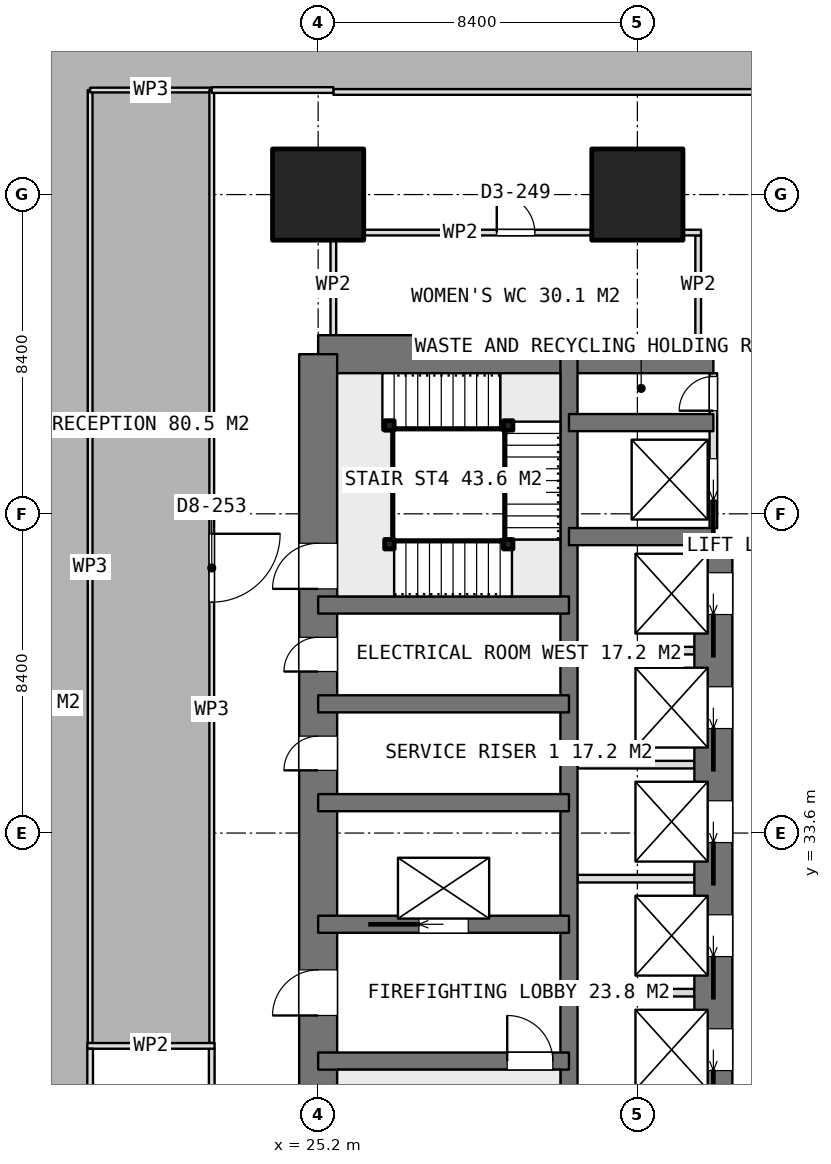
"""IFC4 building model, lengths in metres.
Left out: names, types, materials, properties, quantities, classifications, styles, units other than length and angle.
Written with IfcOpenShell. Run it as: python <this file> out.ifc"""

import sys

from ifc_helpers import new_model, si_unit, direction, frame, frame_2d, origin, origin_2d, place, context, subcontext, project, spatial, rectangle, extrude, element, fill, save


model = new_model("IFC4")
c1 = context("Model", 3, precision=1e-05, world=origin(), true_north=direction((0.0, 1.0)))
c2 = subcontext(c1, "Body", "Model", "MODEL_VIEW")
j1 = project(units=[si_unit("LENGTHUNIT", "METRE"), si_unit("PLANEANGLEUNIT", "RADIAN")], contexts=[c1])
p1 = place(None, origin())
s1 = spatial("IfcSite", under=j1, at=p1, CompositionType="ELEMENT")
p2 = place(p1, origin())
s2 = spatial("IfcBuilding", under=s1, at=p2, CompositionType="ELEMENT")
p3 = place(p2, frame((0.0, 0.0, 228.95)))
s3 = spatial("IfcBuildingStorey", under=s2, at=p3, CompositionType="ELEMENT", Elevation=228.95)
p4 = place(p3, frame((25.2, 46.2, 0.0), z_axis=(0.0, 0.0, 1.0), x_axis=(1.0, 0.0, 0.0)))
e1 = element("IfcWall", 1, at=p4, inside=s3, PredefinedType="SHEAR", context=c2, shape_type="SweptSolid", body=[
    extrude(rectangle(XDim=10.4, YDim=1.0, at=frame_2d((5.2, 0.0))), origin(), (0.0, 0.0, 1.0), 3.75),
])
p5 = place(p3, frame((25.2, 21.0, 0.0), z_axis=(0.0, 0.0, 1.0), x_axis=(0.0, 1.0, 0.0)))
e2 = element("IfcWall", 2, at=p5, inside=s3, PredefinedType="SHEAR", context=c2, shape_type="SweptSolid", body=[
    extrude(rectangle(XDim=25.2, YDim=1.0, at=frame_2d((12.6, 0.0))), origin(), (0.0, 0.0, 1.0), 3.75),
])
p6 = place(p5, frame((7.8, 0.0, 0.0)))
e3 = element("IfcOpeningElement", 3, at=p6, cuts=e2, PredefinedType="OPENING", context=c2, shape_type="SweptSolid", body=[
    extrude(rectangle(XDim=1.2, YDim=2.1, at=frame_2d((0.6, 1.05))), frame((0.0, 0.51, 0.0), z_axis=(0.0, -1.0, 0.0), x_axis=(1.0, 0.0, 0.0)), (0.0, 0.0, 1.0), 1.02),
])
p7 = place(p5, frame((14.25, 0.0, 0.0)))
e4 = element("IfcOpeningElement", 4, at=p7, cuts=e2, PredefinedType="OPENING", context=c2, shape_type="SweptSolid", body=[
    extrude(rectangle(XDim=0.9, YDim=2.1, at=frame_2d((0.45, 1.05))), frame((0.0, 0.51, 0.0), z_axis=(0.0, -1.0, 0.0), x_axis=(1.0, 0.0, 0.0)), (0.0, 0.0, 1.0), 1.02),
])
p8 = place(p5, frame((16.85, 0.0, 0.0)))
e5 = element("IfcOpeningElement", 5, at=p8, cuts=e2, PredefinedType="OPENING", context=c2, shape_type="SweptSolid", body=[
    extrude(rectangle(XDim=0.9, YDim=2.1, at=frame_2d((0.45, 1.05))), frame((0.0, 0.51, 0.0), z_axis=(0.0, -1.0, 0.0), x_axis=(1.0, 0.0, 0.0)), (0.0, 0.0, 1.0), 1.02),
])
p9 = place(p5, frame((19.025, 0.0, 0.0)))
e6 = element("IfcOpeningElement", 6, at=p9, cuts=e2, PredefinedType="OPENING", context=c2, shape_type="SweptSolid", body=[
    extrude(rectangle(XDim=1.2, YDim=2.1, at=frame_2d((0.6, 1.05))), frame((0.0, 0.51, 0.0), z_axis=(0.0, -1.0, 0.0), x_axis=(1.0, 0.0, 0.0)), (0.0, 0.0, 1.0), 1.02),
])
p10 = place(p3, frame((31.8, 21.0, 0.0), z_axis=(0.0, 0.0, 1.0), x_axis=(0.0, 1.0, 0.0)))
e7 = element("IfcWall", 7, at=p10, inside=s3, PredefinedType="SHEAR", context=c2, shape_type="SweptSolid", body=[
    extrude(rectangle(XDim=25.2, YDim=0.45, at=frame_2d((12.6, 0.0))), origin(), (0.0, 0.0, 1.0), 3.75),
])
p11 = place(p3, frame((35.6, 23.4, 0.0), z_axis=(0.0, 0.0, 1.0), x_axis=(0.0, 1.0, 0.0)))
e8 = element("IfcWall", 8, at=p11, inside=s3, PredefinedType="SHEAR", context=c2, shape_type="SweptSolid", body=[
    extrude(rectangle(XDim=18.0, YDim=1.0, at=frame_2d((9.0, 0.0))), origin(), (0.0, 0.0, 1.0), 3.75),
])
p12 = place(p11, frame((0.95, 0.0, 0.0)))
e9 = element("IfcOpeningElement", 9, at=p12, cuts=e8, PredefinedType="OPENING", context=c2, shape_type="SweptSolid", body=[
    extrude(rectangle(XDim=1.1, YDim=2.1, at=frame_2d((0.55, 1.05))), frame((0.0, 0.51, 0.0), z_axis=(0.0, -1.0, 0.0), x_axis=(1.0, 0.0, 0.0)), (0.0, 0.0, 1.0), 1.02),
])
p13 = place(p11, frame((3.95, 0.0, 0.0)))
e10 = element("IfcOpeningElement", 10, at=p13, cuts=e8, PredefinedType="OPENING", context=c2, shape_type="SweptSolid", body=[
    extrude(rectangle(XDim=1.1, YDim=2.1, at=frame_2d((0.55, 1.05))), frame((0.0, 0.51, 0.0), z_axis=(0.0, -1.0, 0.0), x_axis=(1.0, 0.0, 0.0)), (0.0, 0.0, 1.0), 1.02),
])
p14 = place(p11, frame((6.95, 0.0, 0.0)))
e11 = element("IfcOpeningElement", 11, at=p14, cuts=e8, PredefinedType="OPENING", context=c2, shape_type="SweptSolid", body=[
    extrude(rectangle(XDim=1.1, YDim=2.1, at=frame_2d((0.55, 1.05))), frame((0.0, 0.51, 0.0), z_axis=(0.0, -1.0, 0.0), x_axis=(1.0, 0.0, 0.0)), (0.0, 0.0, 1.0), 1.02),
])
p15 = place(p11, frame((9.95, 0.0, 0.0)))
e12 = element("IfcOpeningElement", 12, at=p15, cuts=e8, PredefinedType="OPENING", context=c2, shape_type="SweptSolid", body=[
    extrude(rectangle(XDim=1.1, YDim=2.1, at=frame_2d((0.55, 1.05))), frame((0.0, 0.51, 0.0), z_axis=(0.0, -1.0, 0.0), x_axis=(1.0, 0.0, 0.0)), (0.0, 0.0, 1.0), 1.02),
])
p16 = place(p11, frame((12.95, 0.0, 0.0)))
e13 = element("IfcOpeningElement", 13, at=p16, cuts=e8, PredefinedType="OPENING", context=c2, shape_type="SweptSolid", body=[
    extrude(rectangle(XDim=1.1, YDim=2.1, at=frame_2d((0.55, 1.05))), frame((0.0, 0.51, 0.0), z_axis=(0.0, -1.0, 0.0), x_axis=(1.0, 0.0, 0.0)), (0.0, 0.0, 1.0), 1.02),
])
p17 = place(p11, frame((15.95, 0.0, 0.0)))
e14 = element("IfcOpeningElement", 14, at=p17, cuts=e8, PredefinedType="OPENING", context=c2, shape_type="SweptSolid", body=[
    extrude(rectangle(XDim=1.1, YDim=2.1, at=frame_2d((0.55, 1.05))), frame((0.0, 0.51, 0.0), z_axis=(0.0, -1.0, 0.0), x_axis=(1.0, 0.0, 0.0)), (0.0, 0.0, 1.0), 1.02),
])
for number, where, z_axis, x_axis in (
    (15, (31.8, 41.4, 0.0), (0.0, 0.0, 1.0), (1.0, 0.0, 0.0)),
    (16, (31.8, 44.4, 0.0), (0.0, 0.0, 1.0), (1.0, 0.0, 0.0)),
):
    element("IfcWall", number, at=place(p3, frame(where, z_axis=z_axis, x_axis=x_axis)), inside=s3, PredefinedType="SHEAR", context=c2, shape_type="SweptSolid", body=[
        extrude(rectangle(XDim=3.8, YDim=0.45, at=frame_2d((1.9, 0.0))), origin(), (0.0, 0.0, 1.0), 3.75),
    ])
p18 = place(p3, frame((25.2, 27.6, 0.0), z_axis=(0.0, 0.0, 1.0), x_axis=(1.0, 0.0, 0.0)))
e17 = element("IfcWall", 17, at=p18, inside=s3, PredefinedType="SHEAR", context=c2, shape_type="SweptSolid", body=[
    extrude(rectangle(XDim=6.6, YDim=0.45, at=frame_2d((3.3, 0.0))), origin(), (0.0, 0.0, 1.0), 3.75),
])
p19 = place(p18, frame((4.975, 0.0, 0.0)))
e18 = element("IfcOpeningElement", 18, at=p19, cuts=e17, PredefinedType="OPENING", context=c2, shape_type="SweptSolid", body=[
    extrude(rectangle(XDim=1.2, YDim=2.1, at=frame_2d((0.6, 1.05))), frame((0.0, 0.235, 0.0), z_axis=(0.0, -1.0, 0.0), x_axis=(1.0, 0.0, 0.0)), (0.0, 0.0, 1.0), 0.47),
])
p20 = place(p3, frame((25.2, 31.2, 0.0), z_axis=(0.0, 0.0, 1.0), x_axis=(1.0, 0.0, 0.0)))
e19 = element("IfcWall", 19, at=p20, inside=s3, PredefinedType="SHEAR", context=c2, shape_type="SweptSolid", body=[
    extrude(rectangle(XDim=6.6, YDim=0.45, at=frame_2d((3.3, 0.0))), origin(), (0.0, 0.0, 1.0), 3.75),
])
p21 = place(p20, frame((2.65, 0.0, 0.0)))
e20 = element("IfcOpeningElement", 20, at=p21, cuts=e19, PredefinedType="OPENING", context=c2, shape_type="SweptSolid", body=[
    extrude(rectangle(XDim=1.3, YDim=2.1, at=frame_2d((0.65, 1.05))), frame((0.0, 0.235, 0.0), z_axis=(0.0, -1.0, 0.0), x_axis=(1.0, 0.0, 0.0)), (0.0, 0.0, 1.0), 0.47),
])
for number, where, z_axis, x_axis in (
    (21, (25.2, 34.4, 0.0), (0.0, 0.0, 1.0), (1.0, 0.0, 0.0)),
    (22, (25.2, 37.0, 0.0), (0.0, 0.0, 1.0), (1.0, 0.0, 0.0)),
    (23, (25.2, 39.6, 0.0), (0.0, 0.0, 1.0), (1.0, 0.0, 0.0)),
):
    element("IfcWall", number, at=place(p3, frame(where, z_axis=z_axis, x_axis=x_axis)), inside=s3, PredefinedType="SHEAR", context=c2, shape_type="SweptSolid", body=[
        extrude(rectangle(XDim=6.6, YDim=0.45, at=frame_2d((3.3, 0.0))), origin(), (0.0, 0.0, 1.0), 3.75),
    ])
for number, where, z_axis, x_axis in (
    (24, (25.2, 50.4, 0.0), (0.0, 0.0, 1.0), (1.0, 0.0, 0.0)),
    (25, (33.6, 50.4, 0.0), (0.0, 0.0, 1.0), (1.0, 0.0, 0.0)),
):
    element("IfcColumn", number, at=place(p3, frame(where, z_axis=z_axis, x_axis=x_axis)), inside=s3, PredefinedType="COLUMN", context=c2, shape_type="SweptSolid", body=[
        extrude(rectangle(XDim=2.4, YDim=2.4, at=origin_2d()), origin(), (0.0, 0.0, 1.0), 3.75),
    ])
for number, where, z_axis, x_axis in (
    (26, (32.025, 29.4, 0.0), (0.0, 0.0, 1.0), (1.0, 0.0, 0.0)),
    (27, (32.025, 32.4, 0.0), (0.0, 0.0, 1.0), (1.0, 0.0, 0.0)),
    (28, (32.025, 35.4, 0.0), (0.0, 0.0, 1.0), (1.0, 0.0, 0.0)),
    (29, (32.025, 38.4, 0.0), (0.0, 0.0, 1.0), (1.0, 0.0, 0.0)),
):
    element("IfcWall", number, at=place(p3, frame(where, z_axis=z_axis, x_axis=x_axis)), inside=s3, PredefinedType="PARTITIONING", context=c2, shape_type="SweptSolid", body=[
        extrude(rectangle(XDim=3.075, YDim=0.2, at=frame_2d((1.538, 0.0))), origin(), (0.0, 0.0, 1.0), 3.5),
    ])
p22 = place(p3, frame((35.6, 41.625, 0.0), z_axis=(0.0, 0.0, 1.0), x_axis=(0.0, 1.0, 0.0)))
e30 = element("IfcWall", 30, at=p22, inside=s3, PredefinedType="PARTITIONING", context=c2, shape_type="SweptSolid", body=[
    extrude(rectangle(XDim=4.075, YDim=0.2, at=frame_2d((2.038, 0.0))), origin(), (0.0, 0.0, 1.0), 3.5),
])
p23 = place(p22, frame((3.088, 0.0, 0.0)))
e31 = element("IfcOpeningElement", 31, at=p23, cuts=e30, PredefinedType="OPENING", context=c2, shape_type="SweptSolid", body=[
    extrude(rectangle(XDim=0.9, YDim=2.1, at=frame_2d((0.45, 1.05))), frame((0.0, 0.11, 0.0), z_axis=(0.0, -1.0, 0.0), x_axis=(1.0, 0.0, 0.0)), (0.0, 0.0, 1.0), 0.22),
])
p24 = place(p22, frame((0.725, 0.0, 0.0)))
e32 = element("IfcOpeningElement", 32, at=p24, cuts=e30, PredefinedType="OPENING", context=c2, shape_type="SweptSolid", body=[
    extrude(rectangle(XDim=1.1, YDim=2.1, at=frame_2d((0.55, 1.05))), frame((0.0, 0.11, 0.0), z_axis=(0.0, -1.0, 0.0), x_axis=(1.0, 0.0, 0.0)), (0.0, 0.0, 1.0), 0.22),
])
p25 = place(p3, frame((25.525, 49.4, 0.0), z_axis=(0.0, 0.0, 1.0), x_axis=(1.0, 0.0, 0.0)))
e33 = element("IfcWall", 33, at=p25, inside=s3, PredefinedType="PARTITIONING", context=c2, shape_type="SweptSolid", body=[
    extrude(rectangle(XDim=9.75, YDim=0.15, at=frame_2d((4.875, 0.0))), origin(), (0.0, 0.0, 1.0), 3.5),
])
p26 = place(p25, frame((4.375, 0.0, 0.0)))
e34 = element("IfcOpeningElement", 34, at=p26, cuts=e33, PredefinedType="OPENING", context=c2, shape_type="SweptSolid", body=[
    extrude(rectangle(XDim=1.0, YDim=2.1, at=frame_2d((0.5, 1.05))), frame((0.0, 0.085, 0.0), z_axis=(0.0, -1.0, 0.0), x_axis=(1.0, 0.0, 0.0)), (0.0, 0.0, 1.0), 0.17),
])
for number, where, z_axis, x_axis in (
    (35, (25.6, 46.7, 0.0), (0.0, 0.0, 1.0), (0.0, 1.0, 0.0)),
    (36, (35.2, 46.7, 0.0), (0.0, 0.0, 1.0), (0.0, 1.0, 0.0)),
):
    element("IfcWall", number, at=place(p3, frame(where, z_axis=z_axis, x_axis=x_axis)), inside=s3, PredefinedType="PARTITIONING", context=c2, shape_type="SweptSolid", body=[
        extrude(rectangle(XDim=2.625, YDim=0.15, at=frame_2d((1.312, 0.0))), origin(), (0.0, 0.0, 1.0), 3.5),
    ])
p27 = place(p3, frame((19.125, 28.0, 0.0), z_axis=(0.0, 0.0, 1.0), x_axis=(1.0, 0.0, 0.0)))
e37 = element("IfcWall", 37, at=p27, inside=s3, PredefinedType="PARTITIONING", context=c2, shape_type="SweptSolid", body=[
    extrude(rectangle(XDim=3.35, YDim=0.15, at=frame_2d((1.675, 0.0))), origin(), (0.0, 0.0, 1.0), 3.5),
])
p28 = place(p3, frame((19.2, 21.075, 0.0), z_axis=(0.0, 0.0, 1.0), x_axis=(0.0, 1.0, 0.0)))
e38 = element("IfcWall", 38, at=p28, inside=s3, PredefinedType="PARTITIONING", context=c2, shape_type="SweptSolid", body=[
    extrude(rectangle(XDim=6.85, YDim=0.15, at=frame_2d((3.425, 0.0))), origin(), (0.0, 0.0, 1.0), 3.5),
])
p29 = place(p3, frame((22.4, 21.075, 0.0), z_axis=(0.0, 0.0, 1.0), x_axis=(0.0, 1.0, 0.0)))
e39 = element("IfcWall", 39, at=p29, inside=s3, PredefinedType="PARTITIONING", context=c2, shape_type="SweptSolid", body=[
    extrude(rectangle(XDim=6.85, YDim=0.15, at=frame_2d((3.425, 0.0))), origin(), (0.0, 0.0, 1.0), 3.5),
])
p30 = place(p29, frame((2.925, 0.0, 0.0)))
e40 = element("IfcOpeningElement", 40, at=p30, cuts=e39, PredefinedType="OPENING", context=c2, shape_type="SweptSolid", body=[
    extrude(rectangle(XDim=1.0, YDim=2.1, at=frame_2d((0.5, 1.05))), frame((0.0, 0.085, 0.0), z_axis=(0.0, -1.0, 0.0), x_axis=(1.0, 0.0, 0.0)), (0.0, 0.0, 1.0), 0.17),
])
p31 = place(p3, frame((19.2, 28.075, 0.0), z_axis=(0.0, 0.0, 1.0), x_axis=(0.0, 1.0, 0.0)))
e41 = element("IfcWall", 41, at=p31, inside=s3, PredefinedType="PARTITIONING", context=c2, shape_type="SweptSolid", body=[
    extrude(rectangle(XDim=25.075, YDim=0.125, at=frame_2d((12.538, 0.0))), origin(), (0.0, 0.0, 1.0), 3.5),
])
p32 = place(p3, frame((19.2, 53.15, 0.0), z_axis=(0.0, 0.0, 1.0), x_axis=(1.0, 0.0, 0.0)))
e42 = element("IfcWall", 42, at=p32, inside=s3, PredefinedType="PARTITIONING", context=c2, shape_type="SweptSolid", body=[
    extrude(rectangle(XDim=3.2, YDim=0.125, at=frame_2d((1.6, 0.0))), origin(), (0.0, 0.0, 1.0), 3.5),
])
p33 = place(p3, frame((22.4, 53.15, 0.0), z_axis=(0.0, 0.0, 1.0), x_axis=(0.0, -1.0, 0.0)))
e43 = element("IfcWall", 43, at=p33, inside=s3, PredefinedType="PARTITIONING", context=c2, shape_type="SweptSolid", body=[
    extrude(rectangle(XDim=25.075, YDim=0.125, at=frame_2d((12.538, 0.0))), origin(), (0.0, 0.0, 1.0), 3.5),
])
p34 = place(p33, frame((11.675, 0.0, 0.0)))
e44 = element("IfcOpeningElement", 44, at=p34, cuts=e43, PredefinedType="OPENING", context=c2, shape_type="SweptSolid", body=[
    extrude(rectangle(XDim=1.8, YDim=2.1, at=frame_2d((0.9, 1.05))), frame((0.0, 0.073, 0.0), z_axis=(0.0, -1.0, 0.0), x_axis=(1.0, 0.0, 0.0)), (0.0, 0.0, 1.0), 0.145),
])
p35 = place(p3, frame((53.2, 53.1, 0.0), z_axis=(0.0, 0.0, 1.0), x_axis=(-1.0, 0.0, 0.0)))
e45 = element("IfcWall", 45, at=p35, inside=s3, PredefinedType="PARTITIONING", context=c2, shape_type="SweptSolid", body=[
    extrude(rectangle(XDim=27.6, YDim=0.15, at=frame_2d((13.8, 0.0))), origin(), (0.0, 0.0, 1.0), 3.5),
])
p36 = place(p35, frame((13.3, 0.0, 0.0)))
e46 = element("IfcOpeningElement", 46, at=p36, cuts=e45, PredefinedType="OPENING", context=c2, shape_type="SweptSolid", body=[
    extrude(rectangle(XDim=1.0, YDim=2.1, at=frame_2d((0.5, 1.05))), frame((0.0, 0.085, 0.0), z_axis=(0.0, -1.0, 0.0), x_axis=(1.0, 0.0, 0.0)), (0.0, 0.0, 1.0), 0.17),
])
p37 = place(p3, frame((25.6, 53.15, 0.0), z_axis=(0.0, 0.0, 1.0), x_axis=(-1.0, 0.0, 0.0)))
e47 = element("IfcWall", 47, at=p37, inside=s3, PredefinedType="PARTITIONING", context=c2, shape_type="SweptSolid", body=[
    extrude(rectangle(XDim=3.2, YDim=0.15, at=frame_2d((1.6, 0.0))), origin(), (0.0, 0.0, 1.0), 3.5),
])
for number, where, z_axis, x_axis in (
    (48, (27.075, 41.2, 0.0), (0.0, 0.0, 1.0), (1.0, 0.0, 0.0)),
    (49, (30.2, 41.2, 0.0), (0.0, 0.0, 1.0), (1.0, 0.0, 0.0)),
    (50, (30.2, 44.325, 0.0), (0.0, 0.0, 1.0), (1.0, 0.0, 0.0)),
    (51, (27.075, 44.325, 0.0), (0.0, 0.0, 1.0), (1.0, 0.0, 0.0)),
):
    element("IfcColumn", number, at=place(p3, frame(where, z_axis=z_axis, x_axis=x_axis)), inside=s3, PredefinedType="COLUMN", context=c2, shape_type="SweptSolid", body=[
        extrude(rectangle(XDim=0.25, YDim=0.25, at=origin_2d()), origin(), (0.0, 0.0, 1.0), 3.75),
    ])
p38 = place(p6, origin())
e52 = element("IfcDoor", 52, at=p38, inside=s3, OperationType="SINGLE_SWING_LEFT", PredefinedType="DOOR", context=c2, shape_type="SweptSolid", body=[
    extrude(rectangle(XDim=1.2, YDim=2.1, at=frame_2d((0.6, 1.05))), frame((0.0, 0.025, 0.0), z_axis=(0.0, -1.0, 0.0), x_axis=(1.0, 0.0, 0.0)), (0.0, 0.0, 1.0), 0.05),
])
fill(e3, e52)
p39 = place(p7, origin())
e53 = element("IfcDoor", 53, at=p39, inside=s3, OperationType="SINGLE_SWING_LEFT", PredefinedType="DOOR", context=c2, shape_type="SweptSolid", body=[
    extrude(rectangle(XDim=0.9, YDim=2.1, at=frame_2d((0.45, 1.05))), frame((0.0, 0.025, 0.0), z_axis=(0.0, -1.0, 0.0), x_axis=(1.0, 0.0, 0.0)), (0.0, 0.0, 1.0), 0.05),
])
fill(e4, e53)
p40 = place(p8, origin())
e54 = element("IfcDoor", 54, at=p40, inside=s3, OperationType="SINGLE_SWING_LEFT", PredefinedType="DOOR", context=c2, shape_type="SweptSolid", body=[
    extrude(rectangle(XDim=0.9, YDim=2.1, at=frame_2d((0.45, 1.05))), frame((0.0, 0.025, 0.0), z_axis=(0.0, -1.0, 0.0), x_axis=(1.0, 0.0, 0.0)), (0.0, 0.0, 1.0), 0.05),
])
fill(e5, e54)
p41 = place(p23, origin())
e55 = element("IfcDoor", 55, at=p41, inside=s3, OperationType="SINGLE_SWING_LEFT", PredefinedType="DOOR", context=c2, shape_type="SweptSolid", body=[
    extrude(rectangle(XDim=0.9, YDim=2.1, at=frame_2d((0.45, 1.05))), frame((0.0, 0.025, 0.0), z_axis=(0.0, -1.0, 0.0), x_axis=(1.0, 0.0, 0.0)), (0.0, 0.0, 1.0), 0.05),
])
fill(e31, e55)
p42 = place(p13, origin())
e56 = element("IfcDoor", 56, at=p42, inside=s3, OperationType="SLIDING_TO_LEFT", PredefinedType="USERDEFINED", context=c2, shape_type="SweptSolid", body=[
    extrude(rectangle(XDim=1.1, YDim=2.1, at=frame_2d((0.55, 1.05))), frame((0.0, 0.025, 0.0), z_axis=(0.0, -1.0, 0.0), x_axis=(1.0, 0.0, 0.0)), (0.0, 0.0, 1.0), 0.05),
])
fill(e10, e56)
p43 = place(p14, origin())
e57 = element("IfcDoor", 57, at=p43, inside=s3, OperationType="SLIDING_TO_LEFT", PredefinedType="USERDEFINED", context=c2, shape_type="SweptSolid", body=[
    extrude(rectangle(XDim=1.1, YDim=2.1, at=frame_2d((0.55, 1.05))), frame((0.0, 0.025, 0.0), z_axis=(0.0, -1.0, 0.0), x_axis=(1.0, 0.0, 0.0)), (0.0, 0.0, 1.0), 0.05),
])
fill(e11, e57)
p44 = place(p15, origin())
e58 = element("IfcDoor", 58, at=p44, inside=s3, OperationType="SLIDING_TO_LEFT", PredefinedType="USERDEFINED", context=c2, shape_type="SweptSolid", body=[
    extrude(rectangle(XDim=1.1, YDim=2.1, at=frame_2d((0.55, 1.05))), frame((0.0, 0.025, 0.0), z_axis=(0.0, -1.0, 0.0), x_axis=(1.0, 0.0, 0.0)), (0.0, 0.0, 1.0), 0.05),
])
fill(e12, e58)
p45 = place(p16, origin())
e59 = element("IfcDoor", 59, at=p45, inside=s3, OperationType="SLIDING_TO_LEFT", PredefinedType="USERDEFINED", context=c2, shape_type="SweptSolid", body=[
    extrude(rectangle(XDim=1.1, YDim=2.1, at=frame_2d((0.55, 1.05))), frame((0.0, 0.025, 0.0), z_axis=(0.0, -1.0, 0.0), x_axis=(1.0, 0.0, 0.0)), (0.0, 0.0, 1.0), 0.05),
])
fill(e13, e59)
p46 = place(p17, origin())
e60 = element("IfcDoor", 60, at=p46, inside=s3, OperationType="SLIDING_TO_LEFT", PredefinedType="USERDEFINED", context=c2, shape_type="SweptSolid", body=[
    extrude(rectangle(XDim=1.1, YDim=2.1, at=frame_2d((0.55, 1.05))), frame((0.0, 0.025, 0.0), z_axis=(0.0, -1.0, 0.0), x_axis=(1.0, 0.0, 0.0)), (0.0, 0.0, 1.0), 0.05),
])
fill(e14, e60)
p47 = place(p21, origin())
e61 = element("IfcDoor", 61, at=p47, inside=s3, OperationType="SLIDING_TO_LEFT", PredefinedType="USERDEFINED", context=c2, shape_type="SweptSolid", body=[
    extrude(rectangle(XDim=1.3, YDim=2.1, at=frame_2d((0.65, 1.05))), frame((0.0, 0.025, 0.0), z_axis=(0.0, -1.0, 0.0), x_axis=(1.0, 0.0, 0.0)), (0.0, 0.0, 1.0), 0.05),
])
fill(e20, e61)
p48 = place(p24, origin())
e62 = element("IfcDoor", 62, at=p48, inside=s3, OperationType="SLIDING_TO_LEFT", PredefinedType="USERDEFINED", context=c2, shape_type="SweptSolid", body=[
    extrude(rectangle(XDim=1.1, YDim=2.1, at=frame_2d((0.55, 1.05))), frame((0.0, 0.025, 0.0), z_axis=(0.0, -1.0, 0.0), x_axis=(1.0, 0.0, 0.0)), (0.0, 0.0, 1.0), 0.05),
])
fill(e32, e62)
p49 = place(p26, origin())
e63 = element("IfcDoor", 63, at=p49, inside=s3, OperationType="SINGLE_SWING_LEFT", PredefinedType="DOOR", context=c2, shape_type="SweptSolid", body=[
    extrude(rectangle(XDim=1.0, YDim=2.1, at=frame_2d((0.5, 1.05))), frame((0.0, 0.025, 0.0), z_axis=(0.0, -1.0, 0.0), x_axis=(1.0, 0.0, 0.0)), (0.0, 0.0, 1.0), 0.05),
])
fill(e34, e63)
p50 = place(p34, origin())
e64 = element("IfcDoor", 64, at=p50, inside=s3, OperationType="DOUBLE_DOOR_SINGLE_SWING", PredefinedType="DOOR", context=c2, shape_type="SweptSolid", body=[
    extrude(rectangle(XDim=1.8, YDim=2.1, at=frame_2d((0.9, 1.05))), frame((0.0, 0.025, 0.0), z_axis=(0.0, -1.0, 0.0), x_axis=(1.0, 0.0, 0.0)), (0.0, 0.0, 1.0), 0.05),
])
fill(e44, e64)
p51 = place(p19, origin())
e65 = element("IfcDoor", 65, at=p51, inside=s3, OperationType="SINGLE_SWING_RIGHT", PredefinedType="DOOR", context=c2, shape_type="SweptSolid", body=[
    extrude(rectangle(XDim=1.2, YDim=2.1, at=frame_2d((0.6, 1.05))), frame((0.0, 0.025, 0.0), z_axis=(0.0, -1.0, 0.0), x_axis=(1.0, 0.0, 0.0)), (0.0, 0.0, 1.0), 0.05),
])
fill(e18, e65)
p52 = place(p9, origin())
e66 = element("IfcDoor", 66, at=p52, inside=s3, OperationType="SINGLE_SWING_RIGHT", PredefinedType="DOOR", context=c2, shape_type="SweptSolid", body=[
    extrude(rectangle(XDim=1.2, YDim=2.1, at=frame_2d((0.6, 1.05))), frame((0.0, 0.025, 0.0), z_axis=(0.0, -1.0, 0.0), x_axis=(1.0, 0.0, 0.0)), (0.0, 0.0, 1.0), 0.05),
])
fill(e6, e66)
save(model, sys.argv[1])
